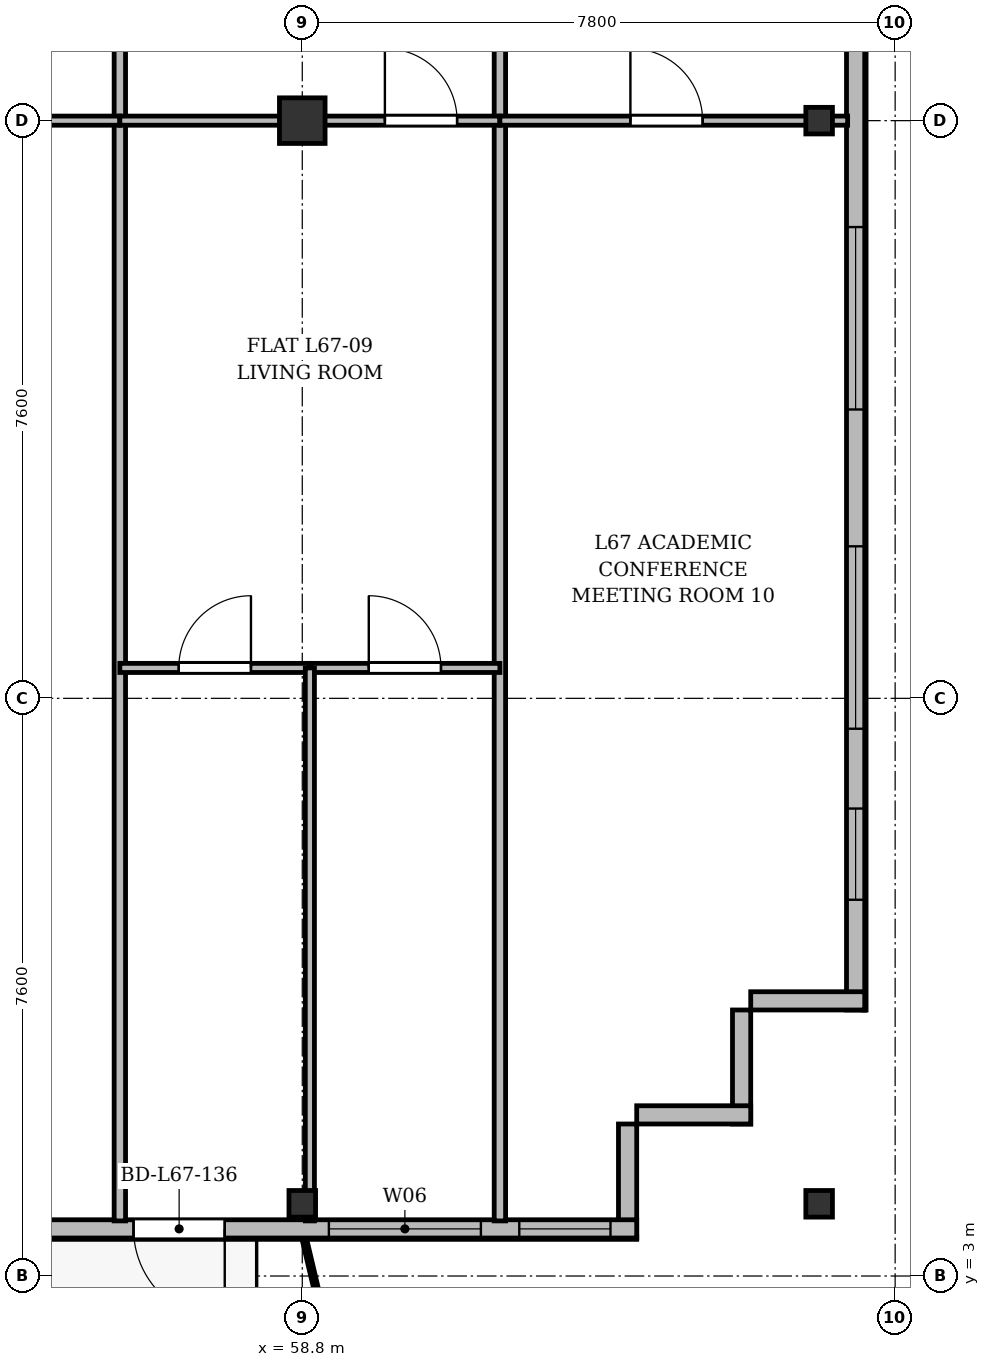
"""IFC4 building model, lengths in metres.
Left out: names, types, materials, properties, quantities, classifications, styles, units other than length and angle.
Written with IfcOpenShell. Run it as: python <this file> out.ifc"""

import sys

from ifc_helpers import new_model, si_unit, direction, frame, frame_2d, origin, origin_2d, place, context, subcontext, project, spatial, rectangle, i_section, extrude, source, transform, mapped, element, fill, save


model = new_model("IFC4")
c1 = context("Model", 3, precision=1e-05, world=origin(), true_north=direction((0.0, 1.0)))
c2 = subcontext(c1, "Body", "Model", "MODEL_VIEW")
j1 = project(units=[si_unit("LENGTHUNIT", "METRE"), si_unit("PLANEANGLEUNIT", "RADIAN")], contexts=[c1])
p1 = place(None, origin())
s1 = spatial("IfcSite", under=j1, at=p1, CompositionType="ELEMENT")
p2 = place(p1, origin())
s2 = spatial("IfcBuilding", under=s1, at=p2, CompositionType="ELEMENT")
p3 = place(p2, frame((0.0, 0.0, 259.5)))
s3 = spatial("IfcBuildingStorey", under=s2, at=p3, CompositionType="ELEMENT", Elevation=259.5)
m1 = source(origin(), c2, "Body", "SweptSolid", [
    extrude(i_section(OverallWidth=0.35, OverallDepth=0.35, WebThickness=0.018, FlangeThickness=0.028, at=origin_2d()), origin(), (0.0, 0.0, 1.0), 3.6),
])
p4 = place(p3, frame((58.8, 3.95, 0.0), z_axis=(0.0, 0.0, 1.0), x_axis=(1.0, 0.0, 0.0)))
e1 = element("IfcColumn", 1, at=p4, inside=s3, PredefinedType="COLUMN", context=c2, shape_type="MappedRepresentation", body=[
    mapped(m1, transform((0.0, 0.0, 0.0), x_axis=(1.0, 0.0, 0.0), y_axis=(0.0, 1.0, 0.0), z_axis=(0.0, 0.0, 1.0), scale=1.0)),
])
m2 = source(origin(), c2, "Body", "SweptSolid", [
    extrude(rectangle(XDim=0.6, YDim=0.6, at=origin_2d()), origin(), (0.0, 0.0, 1.0), 3.6),
])
p5 = place(p3, frame((58.8, 18.2, 0.0), z_axis=(0.0, 0.0, 1.0), x_axis=(1.0, 0.0, 0.0)))
e2 = element("IfcColumn", 2, at=p5, inside=s3, PredefinedType="COLUMN", context=c2, shape_type="MappedRepresentation", body=[
    mapped(m2, transform((0.0, 0.0, 0.0), x_axis=(1.0, 0.0, 0.0), y_axis=(0.0, 1.0, 0.0), z_axis=(0.0, 0.0, 1.0), scale=1.0)),
])
for number, where, z_axis, x_axis in (
    (3, (65.6, 3.95, 0.0), (0.0, 0.0, 1.0), (1.0, 0.0, 0.0)),
    (4, (65.6, 18.2, 0.0), (0.0, 0.0, 1.0), (1.0, 0.0, 0.0)),
):
    element("IfcColumn", number, at=place(p3, frame(where, z_axis=z_axis, x_axis=x_axis)), inside=s3, PredefinedType="COLUMN", context=c2, shape_type="MappedRepresentation", body=[
        mapped(m1, transform((0.0, 0.0, 0.0), x_axis=(1.0, 0.0, 0.0), y_axis=(0.0, 1.0, 0.0), z_axis=(0.0, 0.0, 1.0), scale=1.0)),
    ])
p6 = place(p3, frame((66.08, 45.5, 0.0), z_axis=(0.0, 0.0, 1.0), x_axis=(0.0, -1.0, 0.0)))
e5 = element("IfcWall", 5, at=p6, inside=s3, PredefinedType="SOLIDWALL", context=c2, shape_type="SweptSolid", body=[
    extrude(rectangle(XDim=39.0, YDim=0.24, at=frame_2d((19.5, 0.0))), origin(), (0.0, 0.0, 1.0), 3.37),
])
p7 = place(p6, frame((36.35, 0.0, 0.92)))
e6 = element("IfcOpeningElement", 6, at=p7, cuts=e5, PredefinedType="OPENING", context=c2, shape_type="SweptSolid", body=[
    extrude(rectangle(XDim=1.2, YDim=1.65, at=frame_2d((0.6, 0.825))), frame((0.0, 0.13, 0.0), z_axis=(0.0, -1.0, 0.0), x_axis=(1.0, 0.0, 0.0)), (0.0, 0.0, 1.0), 0.26),
])
p8 = place(p6, frame((32.9, 0.0, 0.92)))
e7 = element("IfcOpeningElement", 7, at=p8, cuts=e5, PredefinedType="OPENING", context=c2, shape_type="SweptSolid", body=[
    extrude(rectangle(XDim=2.4, YDim=2.1, at=frame_2d((1.2, 1.05))), frame((0.0, 0.13, 0.0), z_axis=(0.0, -1.0, 0.0), x_axis=(1.0, 0.0, 0.0)), (0.0, 0.0, 1.0), 0.26),
])
p9 = place(p6, frame((28.7, 0.0, 0.92)))
e8 = element("IfcOpeningElement", 8, at=p9, cuts=e5, PredefinedType="OPENING", context=c2, shape_type="SweptSolid", body=[
    extrude(rectangle(XDim=2.4, YDim=2.1, at=frame_2d((1.2, 1.05))), frame((0.0, 0.13, 0.0), z_axis=(0.0, -1.0, 0.0), x_axis=(1.0, 0.0, 0.0)), (0.0, 0.0, 1.0), 0.26),
])
p10 = place(p6, frame((21.5, 0.0, 0.92)))
e9 = element("IfcOpeningElement", 9, at=p10, cuts=e5, PredefinedType="OPENING", context=c2, shape_type="SweptSolid", body=[
    extrude(rectangle(XDim=2.4, YDim=2.1, at=frame_2d((1.2, 1.05))), frame((0.0, 0.13, 0.0), z_axis=(0.0, -1.0, 0.0), x_axis=(1.0, 0.0, 0.0)), (0.0, 0.0, 1.0), 0.26),
])
p11 = place(p6, frame((7.5, 0.0, 0.92)))
e10 = element("IfcOpeningElement", 10, at=p11, cuts=e5, PredefinedType="OPENING", context=c2, shape_type="SweptSolid", body=[
    extrude(rectangle(XDim=2.4, YDim=2.1, at=frame_2d((1.2, 1.05))), frame((0.0, 0.13, 0.0), z_axis=(0.0, -1.0, 0.0), x_axis=(1.0, 0.0, 0.0)), (0.0, 0.0, 1.0), 0.26),
])
p12 = place(p6, frame((4.5, 0.0, 0.92)))
e11 = element("IfcOpeningElement", 11, at=p12, cuts=e5, PredefinedType="OPENING", context=c2, shape_type="SweptSolid", body=[
    extrude(rectangle(XDim=1.2, YDim=1.65, at=frame_2d((0.6, 0.825))), frame((0.0, 0.13, 0.0), z_axis=(0.0, -1.0, 0.0), x_axis=(1.0, 0.0, 0.0)), (0.0, 0.0, 1.0), 0.26),
])
p13 = place(p6, frame((1.15, 0.0, 0.92)))
e12 = element("IfcOpeningElement", 12, at=p13, cuts=e5, PredefinedType="OPENING", context=c2, shape_type="SweptSolid", body=[
    extrude(rectangle(XDim=1.2, YDim=1.65, at=frame_2d((0.6, 0.825))), frame((0.0, 0.13, 0.0), z_axis=(0.0, -1.0, 0.0), x_axis=(1.0, 0.0, 0.0)), (0.0, 0.0, 1.0), 0.26),
])
p14 = place(p3, frame((66.2, 6.62, 0.0), z_axis=(0.0, 0.0, 1.0), x_axis=(-1.0, 0.0, 0.0)))
e13 = element("IfcWall", 13, at=p14, inside=s3, PredefinedType="SOLIDWALL", context=c2, shape_type="SweptSolid", body=[
    extrude(rectangle(XDim=1.5, YDim=0.24, at=frame_2d((0.75, 0.0))), origin(), (0.0, 0.0, 1.0), 2.87),
])
for number, where, z_axis, x_axis in (
    (14, (64.58, 6.5, 0.0), (0.0, 0.0, 1.0), (0.0, -1.0, 0.0)),
    (15, (64.7, 5.12, 0.0), (0.0, 0.0, 1.0), (-1.0, 0.0, 0.0)),
):
    element("IfcWall", number, at=place(p3, frame(where, z_axis=z_axis, x_axis=x_axis)), inside=s3, PredefinedType="SOLIDWALL", context=c2, shape_type="SweptSolid", body=[
        extrude(rectangle(XDim=1.5, YDim=0.24, at=frame_2d((0.75, 0.0))), origin(), (0.0, 0.0, 1.0), 3.37),
    ])
p15 = place(p3, frame((63.08, 5.0, 0.0), z_axis=(0.0, 0.0, 1.0), x_axis=(0.0, -1.0, 0.0)))
e16 = element("IfcWall", 16, at=p15, inside=s3, PredefinedType="SOLIDWALL", context=c2, shape_type="SweptSolid", body=[
    extrude(rectangle(XDim=1.5, YDim=0.24, at=frame_2d((0.75, 0.0))), origin(), (0.0, 0.0, 1.0), 2.92),
])
p16 = place(p3, frame((63.2, 3.62, 0.0), z_axis=(0.0, 0.0, 1.0), x_axis=(-1.0, 0.0, 0.0)))
e17 = element("IfcWall", 17, at=p16, inside=s3, PredefinedType="SOLIDWALL", context=c2, shape_type="SweptSolid", body=[
    extrude(rectangle(XDim=52.0, YDim=0.24, at=frame_2d((26.0, 0.0))), origin(), (0.0, 0.0, 1.0), 3.37),
])
p17 = place(p16, frame((0.345, 0.0, 0.9)))
e18 = element("IfcOpeningElement", 18, at=p17, cuts=e17, PredefinedType="OPENING", context=c2, shape_type="SweptSolid", body=[
    extrude(rectangle(XDim=1.2, YDim=1.65, at=frame_2d((0.6, 0.825))), frame((0.0, 0.13, 0.0), z_axis=(0.0, -1.0, 0.0), x_axis=(1.0, 0.0, 0.0)), (0.0, 0.0, 1.0), 0.26),
])
p18 = place(p16, frame((2.05, 0.0, 0.9)))
e19 = element("IfcOpeningElement", 19, at=p18, cuts=e17, PredefinedType="OPENING", context=c2, shape_type="SweptSolid", body=[
    extrude(rectangle(XDim=2.0, YDim=1.95, at=frame_2d((1.0, 0.975))), frame((0.0, 0.13, 0.0), z_axis=(0.0, -1.0, 0.0), x_axis=(1.0, 0.0, 0.0)), (0.0, 0.0, 1.0), 0.26),
])
p19 = place(p16, frame((5.42, 0.0, 0.0)))
e20 = element("IfcOpeningElement", 20, at=p19, cuts=e17, PredefinedType="OPENING", context=c2, shape_type="SweptSolid", body=[
    extrude(rectangle(XDim=1.2, YDim=2.2, at=frame_2d((0.6, 1.1))), frame((0.0, 0.13, 0.0), z_axis=(0.0, -1.0, 0.0), x_axis=(1.0, 0.0, 0.0)), (0.0, 0.0, 1.0), 0.26),
])
p20 = place(p16, frame((8.6, 0.0, 0.9)))
e21 = element("IfcOpeningElement", 21, at=p20, cuts=e17, PredefinedType="OPENING", context=c2, shape_type="SweptSolid", body=[
    extrude(rectangle(XDim=1.8, YDim=1.8, at=frame_2d((0.9, 0.9))), frame((0.0, 0.13, 0.0), z_axis=(0.0, -1.0, 0.0), x_axis=(1.0, 0.0, 0.0)), (0.0, 0.0, 1.0), 0.26),
])
p21 = place(p16, frame((14.7, 0.0, 0.9)))
e22 = element("IfcOpeningElement", 22, at=p21, cuts=e17, PredefinedType="OPENING", context=c2, shape_type="SweptSolid", body=[
    extrude(rectangle(XDim=2.2, YDim=1.8, at=frame_2d((1.1, 0.9))), frame((0.0, 0.13, 0.0), z_axis=(0.0, -1.0, 0.0), x_axis=(1.0, 0.0, 0.0)), (0.0, 0.0, 1.0), 0.26),
])
p22 = place(p16, frame((20.5, 0.0, 0.9)))
e23 = element("IfcOpeningElement", 23, at=p22, cuts=e17, PredefinedType="OPENING", context=c2, shape_type="SweptSolid", body=[
    extrude(rectangle(XDim=1.5, YDim=1.75, at=frame_2d((0.75, 0.875))), frame((0.0, 0.13, 0.0), z_axis=(0.0, -1.0, 0.0), x_axis=(1.0, 0.0, 0.0)), (0.0, 0.0, 1.0), 0.26),
])
p23 = place(p16, frame((23.95, 0.0, 0.9)))
e24 = element("IfcOpeningElement", 24, at=p23, cuts=e17, PredefinedType="OPENING", context=c2, shape_type="SweptSolid", body=[
    extrude(rectangle(XDim=2.0, YDim=1.95, at=frame_2d((1.0, 0.975))), frame((0.0, 0.13, 0.0), z_axis=(0.0, -1.0, 0.0), x_axis=(1.0, 0.0, 0.0)), (0.0, 0.0, 1.0), 0.26),
])
p24 = place(p16, frame((28.875, 0.0, 0.9)))
e25 = element("IfcOpeningElement", 25, at=p24, cuts=e17, PredefinedType="OPENING", context=c2, shape_type="SweptSolid", body=[
    extrude(rectangle(XDim=1.65, YDim=1.85, at=frame_2d((0.825, 0.925))), frame((0.0, 0.13, 0.0), z_axis=(0.0, -1.0, 0.0), x_axis=(1.0, 0.0, 0.0)), (0.0, 0.0, 1.0), 0.26),
])
p25 = place(p16, frame((34.078, 0.0, 0.0)))
e26 = element("IfcOpeningElement", 26, at=p25, cuts=e17, PredefinedType="OPENING", context=c2, shape_type="SweptSolid", body=[
    extrude(rectangle(XDim=1.2, YDim=2.2, at=frame_2d((0.6, 1.1))), frame((0.0, 0.13, 0.0), z_axis=(0.0, -1.0, 0.0), x_axis=(1.0, 0.0, 0.0)), (0.0, 0.0, 1.0), 0.26),
])
p26 = place(p16, frame((36.9, 0.0, 0.9)))
e27 = element("IfcOpeningElement", 27, at=p26, cuts=e17, PredefinedType="OPENING", context=c2, shape_type="SweptSolid", body=[
    extrude(rectangle(XDim=2.2, YDim=1.8, at=frame_2d((1.1, 0.9))), frame((0.0, 0.13, 0.0), z_axis=(0.0, -1.0, 0.0), x_axis=(1.0, 0.0, 0.0)), (0.0, 0.0, 1.0), 0.26),
])
p27 = place(p16, frame((41.15, 0.0, 0.9)))
e28 = element("IfcOpeningElement", 28, at=p27, cuts=e17, PredefinedType="OPENING", context=c2, shape_type="SweptSolid", body=[
    extrude(rectangle(XDim=1.5, YDim=1.75, at=frame_2d((0.75, 0.875))), frame((0.0, 0.13, 0.0), z_axis=(0.0, -1.0, 0.0), x_axis=(1.0, 0.0, 0.0)), (0.0, 0.0, 1.0), 0.26),
])
p28 = place(p16, frame((44.19, 0.0, 0.9)))
e29 = element("IfcOpeningElement", 29, at=p28, cuts=e17, PredefinedType="OPENING", context=c2, shape_type="SweptSolid", body=[
    extrude(rectangle(XDim=2.0, YDim=1.95, at=frame_2d((1.0, 0.975))), frame((0.0, 0.13, 0.0), z_axis=(0.0, -1.0, 0.0), x_axis=(1.0, 0.0, 0.0)), (0.0, 0.0, 1.0), 0.26),
])
p29 = place(p16, frame((49.93, 0.0, 0.9)))
e30 = element("IfcOpeningElement", 30, at=p29, cuts=e17, PredefinedType="OPENING", context=c2, shape_type="SweptSolid", body=[
    extrude(rectangle(XDim=1.65, YDim=1.85, at=frame_2d((0.825, 0.925))), frame((0.0, 0.13, 0.0), z_axis=(0.0, -1.0, 0.0), x_axis=(1.0, 0.0, 0.0)), (0.0, 0.0, 1.0), 0.26),
])
for number, where, z_axis, x_axis in (
    (31, (56.4, 3.725, 0.0), (0.0, 0.0, 1.0), (0.0, 1.0, 0.0)),
    (32, (61.4, 3.725, 0.0), (0.0, 0.0, 1.0), (0.0, 1.0, 0.0)),
):
    element("IfcWall", number, at=place(p3, frame(where, z_axis=z_axis, x_axis=x_axis)), inside=s3, PredefinedType="PARTITIONING", context=c2, shape_type="SweptSolid", body=[
        extrude(rectangle(XDim=27.275, YDim=0.15, at=frame_2d((13.637, 0.0))), origin(), (0.0, 0.0, 1.0), 2.92),
    ])
p30 = place(p3, frame((51.0, 18.2, 0.0), z_axis=(0.0, 0.0, 1.0), x_axis=(1.0, 0.0, 0.0)))
e33 = element("IfcWall", 33, at=p30, inside=s3, PredefinedType="PARTITIONING", context=c2, shape_type="SweptSolid", body=[
    extrude(rectangle(XDim=5.4, YDim=0.12, at=frame_2d((2.7, 0.0))), origin(), (0.0, 0.0, 1.0), 2.92),
])
p31 = place(p30, frame((2.225, 0.0, 0.0)))
e34 = element("IfcOpeningElement", 34, at=p31, cuts=e33, PredefinedType="OPENING", context=c2, shape_type="SweptSolid", body=[
    extrude(rectangle(XDim=0.95, YDim=2.15, at=frame_2d((0.475, 1.075))), frame((0.0, 0.07, 0.0), z_axis=(0.0, -1.0, 0.0), x_axis=(1.0, 0.0, 0.0)), (0.0, 0.0, 1.0), 0.14),
])
p32 = place(p3, frame((56.4, 18.2, 0.0), z_axis=(0.0, 0.0, 1.0), x_axis=(1.0, 0.0, 0.0)))
e35 = element("IfcWall", 35, at=p32, inside=s3, PredefinedType="PARTITIONING", context=c2, shape_type="SweptSolid", body=[
    extrude(rectangle(XDim=5.0, YDim=0.12, at=frame_2d((2.5, 0.0))), origin(), (0.0, 0.0, 1.0), 2.92),
])
p33 = place(p32, frame((3.487, 0.0, 0.0)))
e36 = element("IfcOpeningElement", 36, at=p33, cuts=e35, PredefinedType="OPENING", context=c2, shape_type="SweptSolid", body=[
    extrude(rectangle(XDim=0.95, YDim=2.15, at=frame_2d((0.475, 1.075))), frame((0.0, 0.07, 0.0), z_axis=(0.0, -1.0, 0.0), x_axis=(1.0, 0.0, 0.0)), (0.0, 0.0, 1.0), 0.14),
])
p34 = place(p3, frame((56.4, 11.0, 0.0), z_axis=(0.0, 0.0, 1.0), x_axis=(1.0, 0.0, 0.0)))
e37 = element("IfcWall", 37, at=p34, inside=s3, PredefinedType="PARTITIONING", context=c2, shape_type="SweptSolid", body=[
    extrude(rectangle(XDim=2.5, YDim=0.12, at=frame_2d((1.25, 0.0))), origin(), (0.0, 0.0, 1.0), 2.87),
])
p35 = place(p34, frame((0.775, 0.0, 0.0)))
e38 = element("IfcOpeningElement", 38, at=p35, cuts=e37, PredefinedType="OPENING", context=c2, shape_type="SweptSolid", body=[
    extrude(rectangle(XDim=0.95, YDim=2.15, at=frame_2d((0.475, 1.075))), frame((0.0, 0.07, 0.0), z_axis=(0.0, -1.0, 0.0), x_axis=(1.0, 0.0, 0.0)), (0.0, 0.0, 1.0), 0.14),
])
p36 = place(p3, frame((58.9, 11.0, 0.0), z_axis=(0.0, 0.0, 1.0), x_axis=(1.0, 0.0, 0.0)))
e39 = element("IfcWall", 39, at=p36, inside=s3, PredefinedType="PARTITIONING", context=c2, shape_type="SweptSolid", body=[
    extrude(rectangle(XDim=2.5, YDim=0.12, at=frame_2d((1.25, 0.0))), origin(), (0.0, 0.0, 1.0), 3.37),
])
p37 = place(p36, frame((0.775, 0.0, 0.0)))
e40 = element("IfcOpeningElement", 40, at=p37, cuts=e39, PredefinedType="OPENING", context=c2, shape_type="SweptSolid", body=[
    extrude(rectangle(XDim=0.95, YDim=2.15, at=frame_2d((0.475, 1.075))), frame((0.0, 0.07, 0.0), z_axis=(0.0, -1.0, 0.0), x_axis=(1.0, 0.0, 0.0)), (0.0, 0.0, 1.0), 0.14),
])
p38 = place(p3, frame((58.9, 3.725, 0.0), z_axis=(0.0, 0.0, 1.0), x_axis=(0.0, 1.0, 0.0)))
e41 = element("IfcWall", 41, at=p38, inside=s3, PredefinedType="PARTITIONING", context=c2, shape_type="SweptSolid", body=[
    extrude(rectangle(XDim=7.275, YDim=0.12, at=frame_2d((3.637, 0.0))), origin(), (0.0, 0.0, 1.0), 2.87),
])
p39 = place(p3, frame((61.4, 18.2, 0.0), z_axis=(0.0, 0.0, 1.0), x_axis=(1.0, 0.0, 0.0)))
e42 = element("IfcWall", 42, at=p39, inside=s3, PredefinedType="PARTITIONING", context=c2, shape_type="SweptSolid", body=[
    extrude(rectangle(XDim=4.575, YDim=0.12, at=frame_2d((2.288, 0.0))), origin(), (0.0, 0.0, 1.0), 2.92),
])
p40 = place(p39, frame((1.717, 0.0, 0.0)))
e43 = element("IfcOpeningElement", 43, at=p40, cuts=e42, PredefinedType="OPENING", context=c2, shape_type="SweptSolid", body=[
    extrude(rectangle(XDim=0.95, YDim=2.15, at=frame_2d((0.475, 1.075))), frame((0.0, 0.07, 0.0), z_axis=(0.0, -1.0, 0.0), x_axis=(1.0, 0.0, 0.0)), (0.0, 0.0, 1.0), 0.14),
])
m3 = source(origin(), c2, "Body", "SweptSolid", [
    extrude(rectangle(XDim=1.2, YDim=1.65, at=frame_2d((0.6, 0.825))), frame((0.0, 0.03, 0.0), z_axis=(0.0, -1.0, 0.0), x_axis=(1.0, 0.0, 0.0)), (0.0, 0.0, 1.0), 0.06),
])
p41 = place(p7, origin())
e44 = element("IfcWindow", 44, at=p41, inside=s3, PartitioningType="SINGLE_PANEL", PredefinedType="WINDOW", context=c2, shape_type="MappedRepresentation", body=[
    mapped(m3, transform((0.0, 0.0, 0.0), x_axis=(1.0, 0.0, 0.0), y_axis=(0.0, 1.0, 0.0), z_axis=(0.0, 0.0, 1.0), scale=1.0)),
])
fill(e6, e44)
m4 = source(origin(), c2, "Body", "SweptSolid", [
    extrude(rectangle(XDim=2.4, YDim=2.1, at=frame_2d((1.2, 1.05))), frame((0.0, 0.03, 0.0), z_axis=(0.0, -1.0, 0.0), x_axis=(1.0, 0.0, 0.0)), (0.0, 0.0, 1.0), 0.06),
])
p42 = place(p8, origin())
e45 = element("IfcWindow", 45, at=p42, inside=s3, PartitioningType="SINGLE_PANEL", PredefinedType="WINDOW", context=c2, shape_type="MappedRepresentation", body=[
    mapped(m4, transform((0.0, 0.0, 0.0), x_axis=(1.0, 0.0, 0.0), y_axis=(0.0, 1.0, 0.0), z_axis=(0.0, 0.0, 1.0), scale=1.0)),
])
fill(e7, e45)
p43 = place(p9, origin())
e46 = element("IfcWindow", 46, at=p43, inside=s3, PartitioningType="SINGLE_PANEL", PredefinedType="WINDOW", context=c2, shape_type="MappedRepresentation", body=[
    mapped(m4, transform((0.0, 0.0, 0.0), x_axis=(1.0, 0.0, 0.0), y_axis=(0.0, 1.0, 0.0), z_axis=(0.0, 0.0, 1.0), scale=1.0)),
])
fill(e8, e46)
p44 = place(p17, origin())
e47 = element("IfcWindow", 47, at=p44, inside=s3, PartitioningType="SINGLE_PANEL", PredefinedType="WINDOW", context=c2, shape_type="MappedRepresentation", body=[
    mapped(m3, transform((0.0, 0.0, 0.0), x_axis=(1.0, 0.0, 0.0), y_axis=(0.0, 1.0, 0.0), z_axis=(0.0, 0.0, 1.0), scale=1.0)),
])
fill(e18, e47)
m5 = source(origin(), c2, "Body", "SweptSolid", [
    extrude(rectangle(XDim=2.0, YDim=1.95, at=frame_2d((1.0, 0.975))), frame((0.0, 0.03, 0.0), z_axis=(0.0, -1.0, 0.0), x_axis=(1.0, 0.0, 0.0)), (0.0, 0.0, 1.0), 0.06),
])
p45 = place(p18, origin())
e48 = element("IfcWindow", 48, at=p45, inside=s3, PartitioningType="SINGLE_PANEL", PredefinedType="WINDOW", context=c2, shape_type="MappedRepresentation", body=[
    mapped(m5, transform((0.0, 0.0, 0.0), x_axis=(1.0, 0.0, 0.0), y_axis=(0.0, 1.0, 0.0), z_axis=(0.0, 0.0, 1.0), scale=1.0)),
])
fill(e19, e48)
m6 = source(origin(), c2, "Body", "SweptSolid", [
    extrude(rectangle(XDim=1.2, YDim=2.2, at=frame_2d((0.6, 1.1))), frame((0.0, 0.025, 0.0), z_axis=(0.0, -1.0, 0.0), x_axis=(1.0, 0.0, 0.0)), (0.0, 0.0, 1.0), 0.05),
])
p46 = place(p19, origin())
e49 = element("IfcDoor", 49, at=p46, inside=s3, OperationType="SINGLE_SWING_LEFT", PredefinedType="DOOR", context=c2, shape_type="MappedRepresentation", body=[
    mapped(m6, transform((0.0, 0.0, 0.0), x_axis=(1.0, 0.0, 0.0), y_axis=(0.0, 1.0, 0.0), z_axis=(0.0, 0.0, 1.0), scale=1.0)),
])
fill(e20, e49)
m7 = source(origin(), c2, "Body", "SweptSolid", [
    extrude(rectangle(XDim=0.95, YDim=2.15, at=frame_2d((0.475, 1.075))), frame((0.0, 0.025, 0.0), z_axis=(0.0, -1.0, 0.0), x_axis=(1.0, 0.0, 0.0)), (0.0, 0.0, 1.0), 0.05),
])
p47 = place(p33, origin())
e50 = element("IfcDoor", 50, at=p47, inside=s3, OperationType="SINGLE_SWING_LEFT", PredefinedType="DOOR", context=c2, shape_type="MappedRepresentation", body=[
    mapped(m7, transform((0.0, 0.0, 0.0), x_axis=(1.0, 0.0, 0.0), y_axis=(0.0, 1.0, 0.0), z_axis=(0.0, 0.0, 1.0), scale=1.0)),
])
fill(e36, e50)
p48 = place(p35, origin())
e51 = element("IfcDoor", 51, at=p48, inside=s3, OperationType="SINGLE_SWING_RIGHT", PredefinedType="DOOR", context=c2, shape_type="MappedRepresentation", body=[
    mapped(m7, transform((0.0, 0.0, 0.0), x_axis=(1.0, 0.0, 0.0), y_axis=(0.0, 1.0, 0.0), z_axis=(0.0, 0.0, 1.0), scale=1.0)),
])
fill(e38, e51)
p49 = place(p37, origin())
e52 = element("IfcDoor", 52, at=p49, inside=s3, OperationType="SINGLE_SWING_LEFT", PredefinedType="DOOR", context=c2, shape_type="MappedRepresentation", body=[
    mapped(m7, transform((0.0, 0.0, 0.0), x_axis=(1.0, 0.0, 0.0), y_axis=(0.0, 1.0, 0.0), z_axis=(0.0, 0.0, 1.0), scale=1.0)),
])
fill(e40, e52)
p50 = place(p40, origin())
e53 = element("IfcDoor", 53, at=p50, inside=s3, OperationType="SINGLE_SWING_LEFT", PredefinedType="DOOR", context=c2, shape_type="MappedRepresentation", body=[
    mapped(m7, transform((0.0, 0.0, 0.0), x_axis=(1.0, 0.0, 0.0), y_axis=(0.0, 1.0, 0.0), z_axis=(0.0, 0.0, 1.0), scale=1.0)),
])
fill(e43, e53)
save(model, sys.argv[1])
